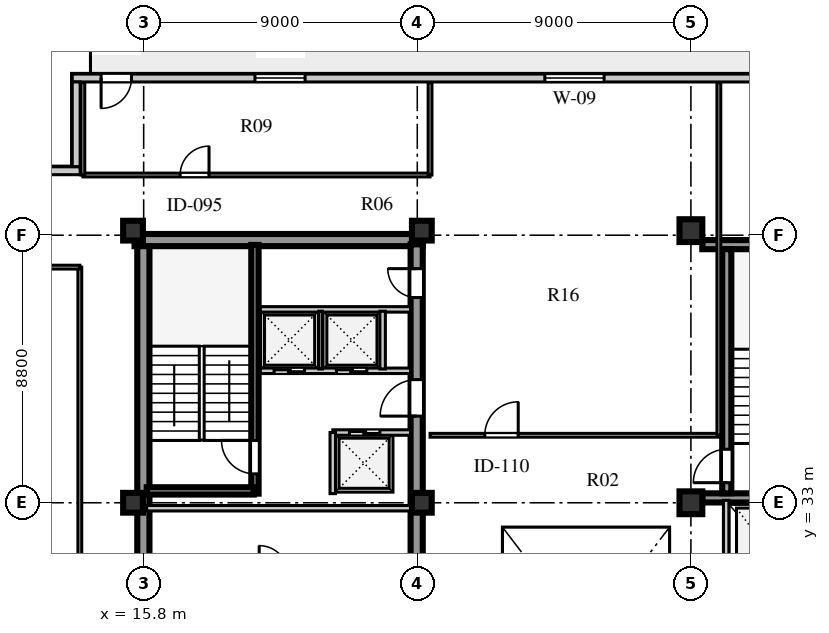
"""IFC4 building model, lengths in metres.
Left out: names, types, materials, properties, quantities, classifications, styles, units other than length and angle.
Written with IfcOpenShell. Run it as: python <this file> out.ifc"""

import sys

from ifc_helpers import new_model, si_unit, direction, frame, frame_2d, origin, origin_2d, place, context, subcontext, project, spatial, rectangle, extrude, element, fill, save


model = new_model("IFC4")
c1 = context("Model", 3, precision=1e-05, world=origin(), true_north=direction((0.0, 1.0)))
c2 = subcontext(c1, "Body", "Model", "MODEL_VIEW")
j1 = project(units=[si_unit("LENGTHUNIT", "METRE"), si_unit("PLANEANGLEUNIT", "RADIAN")], contexts=[c1])
p1 = place(None, origin())
s1 = spatial("IfcSite", under=j1, at=p1, CompositionType="ELEMENT")
p2 = place(p1, origin())
s2 = spatial("IfcBuilding", under=s1, at=p2, CompositionType="ELEMENT")
p3 = place(p2, frame((0.0, 0.0, 280.4)))
s3 = spatial("IfcBuildingStorey", under=s2, at=p3, CompositionType="ELEMENT", Elevation=280.4)
p4 = place(p3, frame((15.5, 41.64, 0.0), z_axis=(0.0, 0.0, 1.0), x_axis=(1.0, 0.0, 0.0)))
e1 = element("IfcWall", 1, at=p4, inside=s3, PredefinedType="SHEAR", context=c2, shape_type="SweptSolid", body=[
    extrude(rectangle(XDim=9.48, YDim=0.4, at=frame_2d((4.74, 0.0))), origin(), (0.0, 0.0, 1.0), 3.66),
])
p5 = place(p3, frame((15.79, 15.81, 0.0), z_axis=(0.0, 0.0, 1.0), x_axis=(0.0, 1.0, 0.0)))
e2 = element("IfcWall", 2, at=p5, inside=s3, PredefinedType="SHEAR", context=c2, shape_type="SweptSolid", body=[
    extrude(rectangle(XDim=25.63, YDim=0.4, at=frame_2d((12.815, 0.0))), origin(), (0.0, 0.0, 1.0), 3.66),
])
p6 = place(p3, frame((24.78, 15.74, 0.0), z_axis=(0.0, 0.0, 1.0), x_axis=(0.0, 1.0, 0.0)))
e3 = element("IfcWall", 3, at=p6, inside=s3, PredefinedType="SHEAR", context=c2, shape_type="SweptSolid", body=[
    extrude(rectangle(XDim=25.76, YDim=0.4, at=frame_2d((12.88, 0.0))), origin(), (0.0, 0.0, 1.0), 3.66),
])
p7 = place(p6, frame((1.61, 0.0, 0.0)))
e4 = element("IfcOpeningElement", 4, at=p7, cuts=e3, PredefinedType="OPENING", context=c2, shape_type="SweptSolid", body=[
    extrude(rectangle(XDim=1.2, YDim=2.1, at=frame_2d((0.6, 1.05))), frame((0.0, 0.21, 0.0), z_axis=(0.0, -1.0, 0.0), x_axis=(1.0, 0.0, 0.0)), (0.0, 0.0, 1.0), 0.42),
])
p8 = place(p6, frame((6.78, 0.0, 0.0)))
e5 = element("IfcOpeningElement", 5, at=p8, cuts=e3, PredefinedType="OPENING", context=c2, shape_type="SweptSolid", body=[
    extrude(rectangle(XDim=0.85, YDim=2.06, at=frame_2d((0.425, 1.03))), frame((0.0, 0.21, 0.0), z_axis=(0.0, -1.0, 0.0), x_axis=(1.0, 0.0, 0.0)), (0.0, 0.0, 1.0), 0.42),
])
p9 = place(p6, frame((12.11, 0.0, 0.0)))
e6 = element("IfcOpeningElement", 6, at=p9, cuts=e3, PredefinedType="OPENING", context=c2, shape_type="SweptSolid", body=[
    extrude(rectangle(XDim=1.5, YDim=2.12, at=frame_2d((0.75, 1.06))), frame((0.0, 0.21, 0.0), z_axis=(0.0, -1.0, 0.0), x_axis=(1.0, 0.0, 0.0)), (0.0, 0.0, 1.0), 0.42),
])
p10 = place(p6, frame((20.11, 0.0, 0.0)))
e7 = element("IfcOpeningElement", 7, at=p10, cuts=e3, PredefinedType="OPENING", context=c2, shape_type="SweptSolid", body=[
    extrude(rectangle(XDim=1.2, YDim=2.12, at=frame_2d((0.6, 1.06))), frame((0.0, 0.21, 0.0), z_axis=(0.0, -1.0, 0.0), x_axis=(1.0, 0.0, 0.0)), (0.0, 0.0, 1.0), 0.42),
])
p11 = place(p6, frame((24.01, 0.0, 0.0)))
e8 = element("IfcOpeningElement", 8, at=p11, cuts=e3, PredefinedType="OPENING", context=c2, shape_type="SweptSolid", body=[
    extrude(rectangle(XDim=0.95, YDim=2.1, at=frame_2d((0.475, 1.05))), frame((0.0, 0.21, 0.0), z_axis=(0.0, -1.0, 0.0), x_axis=(1.0, 0.0, 0.0)), (0.0, 0.0, 1.0), 0.42),
])
for number, where, z_axis, x_axis in (
    (9, (34.175, 33.16, 0.0), (0.0, 0.0, 1.0), (1.0, 0.0, 0.0)),
    (10, (34.175, 41.49, 0.0), (0.0, 0.0, 1.0), (1.0, 0.0, 0.0)),
):
    element("IfcWall", number, at=place(p3, frame(where, z_axis=z_axis, x_axis=x_axis)), inside=s3, PredefinedType="SHEAR", context=c2, shape_type="SweptSolid", body=[
        extrude(rectangle(XDim=4.695, YDim=0.3, at=frame_2d((2.348, 0.0))), origin(), (0.0, 0.0, 1.0), 3.66),
    ])
p12 = place(p3, frame((34.98, 33.31, 0.0), z_axis=(0.0, 0.0, 1.0), x_axis=(0.0, 1.0, 0.0)))
e11 = element("IfcWall", 11, at=p12, inside=s3, PredefinedType="SHEAR", context=c2, shape_type="SweptSolid", body=[
    extrude(rectangle(XDim=8.03, YDim=0.3, at=frame_2d((4.015, 0.0))), origin(), (0.0, 0.0, 1.0), 3.66),
])
p13 = place(p12, frame((0.35, 0.0, 0.0)))
e12 = element("IfcOpeningElement", 12, at=p13, cuts=e11, PredefinedType="OPENING", context=c2, shape_type="SweptSolid", body=[
    extrude(rectangle(XDim=1.1, YDim=2.1, at=frame_2d((0.55, 1.05))), frame((0.0, 0.16, 0.0), z_axis=(0.0, -1.0, 0.0), x_axis=(1.0, 0.0, 0.0)), (0.0, 0.0, 1.0), 0.32),
])
for number, where, z_axis, x_axis in (
    (13, (15.45, 33.0, 0.0), (0.0, 0.0, 1.0), (1.0, 0.0, 0.0)),
    (14, (15.45, 41.95, 0.0), (0.0, 0.0, 1.0), (1.0, 0.0, 0.0)),
    (15, (24.95, 33.0, 0.0), (0.0, 0.0, 1.0), (1.0, 0.0, 0.0)),
    (16, (24.95, 41.95, 0.0), (0.0, 0.0, 1.0), (1.0, 0.0, 0.0)),
):
    element("IfcColumn", number, at=place(p3, frame(where, z_axis=z_axis, x_axis=x_axis)), inside=s3, PredefinedType="COLUMN", context=c2, shape_type="SweptSolid", body=[
        extrude(rectangle(XDim=0.65, YDim=0.65, at=origin_2d()), origin(), (0.0, 0.0, 1.0), 3.66),
    ])
for number, where, z_axis, x_axis in (
    (17, (33.8, 33.0, 0.0), (0.0, 0.0, 1.0), (1.0, 0.0, 0.0)),
    (18, (33.8, 41.95, 0.0), (0.0, 0.0, 1.0), (1.0, 0.0, 0.0)),
):
    element("IfcColumn", number, at=place(p3, frame(where, z_axis=z_axis, x_axis=x_axis)), inside=s3, PredefinedType="COLUMN", context=c2, shape_type="SweptSolid", body=[
        extrude(rectangle(XDim=0.75, YDim=0.75, at=origin_2d()), origin(), (0.0, 0.0, 1.0), 3.66),
    ])
p14 = place(p3, frame((45.15, 46.97, 0.0), z_axis=(0.0, 0.0, 1.0), x_axis=(-1.0, 0.0, 0.0)))
e19 = element("IfcWall", 19, at=p14, inside=s3, PredefinedType="SOLIDWALL", context=c2, shape_type="SweptSolid", body=[
    extrude(rectangle(XDim=31.7, YDim=0.26, at=frame_2d((15.85, 0.0))), origin(), (0.0, 0.0, 1.0), 3.66),
])
p15 = place(p14, frame((29.75, 0.0, 0.0)))
e20 = element("IfcOpeningElement", 20, at=p15, cuts=e19, PredefinedType="OPENING", context=c2, shape_type="SweptSolid", body=[
    extrude(rectangle(XDim=1.0, YDim=2.05, at=frame_2d((0.5, 1.025))), frame((0.0, 0.14, 0.0), z_axis=(0.0, -1.0, 0.0), x_axis=(1.0, 0.0, 0.0)), (0.0, 0.0, 1.0), 0.28),
])
p16 = place(p14, frame((24.04, 0.0, 0.8)))
e21 = element("IfcOpeningElement", 21, at=p16, cuts=e19, PredefinedType="OPENING", context=c2, shape_type="SweptSolid", body=[
    extrude(rectangle(XDim=1.65, YDim=1.95, at=frame_2d((0.825, 0.975))), frame((0.0, 0.14, 0.0), z_axis=(0.0, -1.0, 0.0), x_axis=(1.0, 0.0, 0.0)), (0.0, 0.0, 1.0), 0.28),
])
p17 = place(p14, frame((14.205, 0.0, 0.8)))
e22 = element("IfcOpeningElement", 22, at=p17, cuts=e19, PredefinedType="OPENING", context=c2, shape_type="SweptSolid", body=[
    extrude(rectangle(XDim=1.95, YDim=2.0, at=frame_2d((0.975, 1.0))), frame((0.0, 0.14, 0.0), z_axis=(0.0, -1.0, 0.0), x_axis=(1.0, 0.0, 0.0)), (0.0, 0.0, 1.0), 0.28),
])
p18 = place(p14, frame((4.145, 0.0, 0.8)))
e23 = element("IfcOpeningElement", 23, at=p18, cuts=e19, PredefinedType="OPENING", context=c2, shape_type="SweptSolid", body=[
    extrude(rectangle(XDim=2.25, YDim=2.0, at=frame_2d((1.125, 1.0))), frame((0.0, 0.14, 0.0), z_axis=(0.0, -1.0, 0.0), x_axis=(1.0, 0.0, 0.0)), (0.0, 0.0, 1.0), 0.28),
])
p19 = place(p3, frame((13.58, 46.84, 0.0), z_axis=(0.0, 0.0, 1.0), x_axis=(0.0, -1.0, 0.0)))
e24 = element("IfcWall", 24, at=p19, inside=s3, PredefinedType="SOLIDWALL", context=c2, shape_type="SweptSolid", body=[
    extrude(rectangle(XDim=2.79, YDim=0.26, at=frame_2d((1.395, 0.0))), origin(), (0.0, 0.0, 1.0), 3.66),
])
p20 = place(p3, frame((13.71, 43.92, 0.0), z_axis=(0.0, 0.0, 1.0), x_axis=(-1.0, 0.0, 0.0)))
e25 = element("IfcWall", 25, at=p20, inside=s3, PredefinedType="SOLIDWALL", context=c2, shape_type="SweptSolid", body=[
    extrude(rectangle(XDim=3.31, YDim=0.26, at=frame_2d((1.655, 0.0))), origin(), (0.0, 0.0, 1.0), 3.66),
])
p21 = place(p3, frame((15.9, 32.82, 0.0), z_axis=(0.0, 0.0, 1.0), x_axis=(1.0, 0.0, 0.0)))
e26 = element("IfcWall", 26, at=p21, inside=s3, PredefinedType="SOLIDWALL", context=c2, shape_type="SweptSolid", body=[
    extrude(rectangle(XDim=8.68, YDim=0.18, at=frame_2d((4.34, 0.0))), origin(), (0.0, 0.0, 1.0), 3.06),
])
p22 = place(p3, frame((19.46, 33.3, 0.0), z_axis=(0.0, 0.0, 1.0), x_axis=(0.0, 1.0, 0.0)))
e27 = element("IfcWall", 27, at=p22, inside=s3, PredefinedType="SHEAR", context=c2, shape_type="SweptSolid", body=[
    extrude(rectangle(XDim=8.18, YDim=0.24, at=frame_2d((4.09, 0.0))), origin(), (0.0, 0.0, 1.0), 3.9),
])
p23 = place(p22, frame((0.65, 0.0, 0.0)))
e28 = element("IfcOpeningElement", 28, at=p23, cuts=e27, PredefinedType="OPENING", context=c2, shape_type="SweptSolid", body=[
    extrude(rectangle(XDim=1.1, YDim=2.1, at=frame_2d((0.55, 1.05))), frame((0.0, 0.13, 0.0), z_axis=(0.0, -1.0, 0.0), x_axis=(1.0, 0.0, 0.0)), (0.0, 0.0, 1.0), 0.26),
])
p24 = place(p3, frame((15.9, 33.39, 0.0), z_axis=(0.0, 0.0, 1.0), x_axis=(1.0, 0.0, 0.0)))
e29 = element("IfcWall", 29, at=p24, inside=s3, PredefinedType="SHEAR", context=c2, shape_type="SweptSolid", body=[
    extrude(rectangle(XDim=3.52, YDim=0.24, at=frame_2d((1.76, 0.0))), origin(), (0.0, 0.0, 1.0), 3.9),
])
p25 = place(p3, frame((22.02, 35.31, 0.0), z_axis=(0.0, 0.0, 1.0), x_axis=(1.0, 0.0, 0.0)))
e30 = element("IfcWall", 30, at=p25, inside=s3, PredefinedType="SOLIDWALL", context=c2, shape_type="SweptSolid", body=[
    extrude(rectangle(XDim=2.56, YDim=0.18, at=frame_2d((1.28, 0.0))), origin(), (0.0, 0.0, 1.0), 3.66),
])
p26 = place(p25, frame((0.55, 0.0, 0.0)))
e31 = element("IfcOpeningElement", 31, at=p26, cuts=e30, PredefinedType="OPENING", context=c2, shape_type="SweptSolid", body=[
    extrude(rectangle(XDim=1.0, YDim=2.1, at=frame_2d((0.5, 1.05))), frame((0.0, 0.1, 0.0), z_axis=(0.0, -1.0, 0.0), x_axis=(1.0, 0.0, 0.0)), (0.0, 0.0, 1.0), 0.2),
])
p27 = place(p3, frame((22.02, 33.3, 0.0), z_axis=(0.0, 0.0, 1.0), x_axis=(0.0, 1.0, 0.0)))
e32 = element("IfcWall", 32, at=p27, inside=s3, PredefinedType="SOLIDWALL", context=c2, shape_type="SweptSolid", body=[
    extrude(rectangle(XDim=2.01, YDim=0.18, at=frame_2d((1.005, 0.0))), origin(), (0.0, 0.0, 1.0), 3.66),
])
p28 = place(p3, frame((19.64, 37.34, 0.0), z_axis=(0.0, 0.0, 1.0), x_axis=(1.0, 0.0, 0.0)))
e33 = element("IfcWall", 33, at=p28, inside=s3, PredefinedType="SOLIDWALL", context=c2, shape_type="SweptSolid", body=[
    extrude(rectangle(XDim=4.94, YDim=0.18, at=frame_2d((2.47, 0.0))), origin(), (0.0, 0.0, 1.0), 3.66),
])
p29 = place(p28, frame((0.45, 0.0, 0.0)))
e34 = element("IfcOpeningElement", 34, at=p29, cuts=e33, PredefinedType="OPENING", context=c2, shape_type="SweptSolid", body=[
    extrude(rectangle(XDim=1.0, YDim=2.1, at=frame_2d((0.5, 1.05))), frame((0.0, 0.1, 0.0), z_axis=(0.0, -1.0, 0.0), x_axis=(1.0, 0.0, 0.0)), (0.0, 0.0, 1.0), 0.2),
])
p30 = place(p28, frame((2.5, 0.0, 0.0)))
e35 = element("IfcOpeningElement", 35, at=p30, cuts=e33, PredefinedType="OPENING", context=c2, shape_type="SweptSolid", body=[
    extrude(rectangle(XDim=1.0, YDim=2.1, at=frame_2d((0.5, 1.05))), frame((0.0, 0.1, 0.0), z_axis=(0.0, -1.0, 0.0), x_axis=(1.0, 0.0, 0.0)), (0.0, 0.0, 1.0), 0.2),
])
p31 = place(p3, frame((19.64, 39.36, 0.0), z_axis=(0.0, 0.0, 1.0), x_axis=(1.0, 0.0, 0.0)))
e36 = element("IfcWall", 36, at=p31, inside=s3, PredefinedType="SOLIDWALL", context=c2, shape_type="SweptSolid", body=[
    extrude(rectangle(XDim=4.94, YDim=0.18, at=frame_2d((2.47, 0.0))), origin(), (0.0, 0.0, 1.0), 3.66),
])
p32 = place(p3, frame((21.62, 37.4, 0.0), z_axis=(0.0, 0.0, 1.0), x_axis=(0.0, 1.0, 0.0)))
e37 = element("IfcWall", 37, at=p32, inside=s3, PredefinedType="PARTITIONING", context=c2, shape_type="SweptSolid", body=[
    extrude(rectangle(XDim=1.9, YDim=0.12, at=frame_2d((0.95, 0.0))), origin(), (0.0, 0.0, 1.0), 3.66),
])
p33 = place(p3, frame((23.66, 37.4, 0.0), z_axis=(0.0, 0.0, 1.0), x_axis=(0.0, 1.0, 0.0)))
e38 = element("IfcWall", 38, at=p33, inside=s3, PredefinedType="SOLIDWALL", context=c2, shape_type="SweptSolid", body=[
    extrude(rectangle(XDim=1.9, YDim=0.18, at=frame_2d((0.95, 0.0))), origin(), (0.0, 0.0, 1.0), 3.66),
])
p34 = place(p3, frame((34.96, 28.86, 0.0), z_axis=(0.0, 0.0, 1.0), x_axis=(0.0, 1.0, 0.0)))
e39 = element("IfcWall", 39, at=p34, inside=s3, PredefinedType="SOLIDWALL", context=c2, shape_type="SweptSolid", body=[
    extrude(rectangle(XDim=4.22, YDim=0.18, at=frame_2d((2.11, 0.0))), origin(), (0.0, 0.0, 1.0), 3.66),
])
p35 = place(p3, frame((25.22, 35.22, 0.0), z_axis=(0.0, 0.0, 1.0), x_axis=(1.0, 0.0, 0.0)))
e40 = element("IfcWall", 40, at=p35, inside=s3, PredefinedType="PLUMBINGWALL", context=c2, shape_type="SweptSolid", body=[
    extrude(rectangle(XDim=9.5, YDim=0.125, at=frame_2d((4.75, 0.0))), origin(), (0.0, 0.0, 1.0), 3.66),
])
p36 = place(p35, frame((1.8, 0.0, 0.0)))
e41 = element("IfcOpeningElement", 41, at=p36, cuts=e40, PredefinedType="OPENING", context=c2, shape_type="SweptSolid", body=[
    extrude(rectangle(XDim=1.1, YDim=2.08, at=frame_2d((0.55, 1.04))), frame((0.0, 0.073, 0.0), z_axis=(0.0, -1.0, 0.0), x_axis=(1.0, 0.0, 0.0)), (0.0, 0.0, 1.0), 0.145),
])
p37 = place(p3, frame((13.8, 43.78, 0.0), z_axis=(0.0, 0.0, 1.0), x_axis=(1.0, 0.0, 0.0)))
e42 = element("IfcWall", 42, at=p37, inside=s3, PredefinedType="PLUMBINGWALL", context=c2, shape_type="SweptSolid", body=[
    extrude(rectangle(XDim=11.42, YDim=0.125, at=frame_2d((5.71, 0.0))), origin(), (0.0, 0.0, 1.0), 3.66),
])
p38 = place(p37, frame((3.2, 0.0, 0.0)))
e43 = element("IfcOpeningElement", 43, at=p38, cuts=e42, PredefinedType="OPENING", context=c2, shape_type="SweptSolid", body=[
    extrude(rectangle(XDim=0.95, YDim=2.08, at=frame_2d((0.475, 1.04))), frame((0.0, 0.073, 0.0), z_axis=(0.0, -1.0, 0.0), x_axis=(1.0, 0.0, 0.0)), (0.0, 0.0, 1.0), 0.145),
])
p39 = place(p3, frame((13.8, 43.78, 0.0), z_axis=(0.0, 0.0, 1.0), x_axis=(0.0, 1.0, 0.0)))
e44 = element("IfcWall", 44, at=p39, inside=s3, PredefinedType="PLUMBINGWALL", context=c2, shape_type="SweptSolid", body=[
    extrude(rectangle(XDim=3.04, YDim=0.125, at=frame_2d((1.52, 0.0))), origin(), (0.0, 0.0, 1.0), 3.66),
])
p40 = place(p3, frame((25.22, 43.78, 0.0), z_axis=(0.0, 0.0, 1.0), x_axis=(0.0, 1.0, 0.0)))
e45 = element("IfcWall", 45, at=p40, inside=s3, PredefinedType="PLUMBINGWALL", context=c2, shape_type="SweptSolid", body=[
    extrude(rectangle(XDim=3.04, YDim=0.125, at=frame_2d((1.52, 0.0))), origin(), (0.0, 0.0, 1.0), 3.21),
])
p41 = place(p3, frame((13.7, 16.45, 0.0), z_axis=(0.0, 0.0, 1.0), x_axis=(0.0, 1.0, 0.0)))
e46 = element("IfcWall", 46, at=p41, inside=s3, PredefinedType="PLUMBINGWALL", context=c2, shape_type="SweptSolid", body=[
    extrude(rectangle(XDim=24.3, YDim=0.125, at=frame_2d((12.15, 0.0))), origin(), (0.0, 0.0, 1.0), 3.66),
])
p42 = place(p41, frame((5.1, 0.0, 0.0)))
e47 = element("IfcOpeningElement", 47, at=p42, cuts=e46, PredefinedType="OPENING", context=c2, shape_type="SweptSolid", body=[
    extrude(rectangle(XDim=0.95, YDim=2.08, at=frame_2d((0.475, 1.04))), frame((0.0, 0.073, 0.0), z_axis=(0.0, -1.0, 0.0), x_axis=(1.0, 0.0, 0.0)), (0.0, 0.0, 1.0), 0.145),
])
p43 = place(p3, frame((10.68, 40.75, 0.0), z_axis=(0.0, 0.0, 1.0), x_axis=(1.0, 0.0, 0.0)))
e48 = element("IfcWall", 48, at=p43, inside=s3, PredefinedType="PLUMBINGWALL", context=c2, shape_type="SweptSolid", body=[
    extrude(rectangle(XDim=3.02, YDim=0.125, at=frame_2d((1.51, 0.0))), origin(), (0.0, 0.0, 1.0), 3.66),
])
p44 = place(p3, frame((34.72, 35.22, 0.0), z_axis=(0.0, 0.0, 1.0), x_axis=(0.0, 1.0, 0.0)))
e49 = element("IfcWall", 49, at=p44, inside=s3, PredefinedType="PLUMBINGWALL", context=c2, shape_type="SweptSolid", body=[
    extrude(rectangle(XDim=11.6, YDim=0.125, at=frame_2d((5.8, 0.0))), origin(), (0.0, 0.0, 1.0), 3.66),
])
p45 = place(p15, frame((1.0, 0.0, 0.0), z_axis=(0.0, 0.0, 1.0), x_axis=(-1.0, 0.0, 0.0)))
e50 = element("IfcDoor", 50, at=p45, inside=s3, OperationType="SINGLE_SWING_LEFT", PredefinedType="DOOR", context=c2, shape_type="SweptSolid", body=[
    extrude(rectangle(XDim=1.0, YDim=2.05, at=frame_2d((0.5, 1.025))), frame((0.0, 0.025, 0.0), z_axis=(0.0, -1.0, 0.0), x_axis=(1.0, 0.0, 0.0)), (0.0, 0.0, 1.0), 0.05),
])
fill(e20, e50)
p46 = place(p16, origin())
e51 = element("IfcWindow", 51, at=p46, inside=s3, PartitioningType="SINGLE_PANEL", PredefinedType="WINDOW", context=c2, shape_type="SweptSolid", body=[
    extrude(rectangle(XDim=1.65, YDim=1.95, at=frame_2d((0.825, 0.975))), frame((0.0, 0.03, 0.0), z_axis=(0.0, -1.0, 0.0), x_axis=(1.0, 0.0, 0.0)), (0.0, 0.0, 1.0), 0.06),
])
fill(e21, e51)
p47 = place(p17, origin())
e52 = element("IfcWindow", 52, at=p47, inside=s3, PartitioningType="SINGLE_PANEL", PredefinedType="WINDOW", context=c2, shape_type="SweptSolid", body=[
    extrude(rectangle(XDim=1.95, YDim=2.0, at=frame_2d((0.975, 1.0))), frame((0.0, 0.03, 0.0), z_axis=(0.0, -1.0, 0.0), x_axis=(1.0, 0.0, 0.0)), (0.0, 0.0, 1.0), 0.06),
])
fill(e22, e52)
p48 = place(p23, origin())
e53 = element("IfcDoor", 53, at=p48, inside=s3, OperationType="SINGLE_SWING_RIGHT", PredefinedType="DOOR", context=c2, shape_type="SweptSolid", body=[
    extrude(rectangle(XDim=1.1, YDim=2.1, at=frame_2d((0.55, 1.05))), frame((0.0, 0.025, 0.0), z_axis=(0.0, -1.0, 0.0), x_axis=(1.0, 0.0, 0.0)), (0.0, 0.0, 1.0), 0.05),
])
fill(e28, e53)
p49 = place(p10, frame((1.2, 0.0, 0.0), z_axis=(0.0, 0.0, 1.0), x_axis=(-1.0, 0.0, 0.0)))
e54 = element("IfcDoor", 54, at=p49, inside=s3, OperationType="SINGLE_SWING_RIGHT", PredefinedType="DOOR", context=c2, shape_type="SweptSolid", body=[
    extrude(rectangle(XDim=1.2, YDim=2.12, at=frame_2d((0.6, 1.06))), frame((0.0, 0.025, 0.0), z_axis=(0.0, -1.0, 0.0), x_axis=(1.0, 0.0, 0.0)), (0.0, 0.0, 1.0), 0.05),
])
fill(e7, e54)
p50 = place(p29, frame((1.0, 0.0, 0.0), z_axis=(0.0, 0.0, 1.0), x_axis=(-1.0, 0.0, 0.0)))
e55 = element("IfcDoor", 55, at=p50, inside=s3, OperationType="DOUBLE_DOOR_SLIDING", PredefinedType="DOOR", context=c2, shape_type="SweptSolid", body=[
    extrude(rectangle(XDim=1.0, YDim=2.1, at=frame_2d((0.5, 1.05))), frame((0.0, 0.025, 0.0), z_axis=(0.0, -1.0, 0.0), x_axis=(1.0, 0.0, 0.0)), (0.0, 0.0, 1.0), 0.05),
])
fill(e34, e55)
p51 = place(p30, frame((1.0, 0.0, 0.0), z_axis=(0.0, 0.0, 1.0), x_axis=(-1.0, 0.0, 0.0)))
e56 = element("IfcDoor", 56, at=p51, inside=s3, OperationType="DOUBLE_DOOR_SLIDING", PredefinedType="DOOR", context=c2, shape_type="SweptSolid", body=[
    extrude(rectangle(XDim=1.0, YDim=2.1, at=frame_2d((0.5, 1.05))), frame((0.0, 0.025, 0.0), z_axis=(0.0, -1.0, 0.0), x_axis=(1.0, 0.0, 0.0)), (0.0, 0.0, 1.0), 0.05),
])
fill(e35, e56)
p52 = place(p26, origin())
e57 = element("IfcDoor", 57, at=p52, inside=s3, OperationType="DOUBLE_DOOR_SLIDING", PredefinedType="DOOR", context=c2, shape_type="SweptSolid", body=[
    extrude(rectangle(XDim=1.0, YDim=2.1, at=frame_2d((0.5, 1.05))), frame((0.0, 0.025, 0.0), z_axis=(0.0, -1.0, 0.0), x_axis=(1.0, 0.0, 0.0)), (0.0, 0.0, 1.0), 0.05),
])
fill(e31, e57)
p53 = place(p11, frame((0.95, 0.0, 0.0), z_axis=(0.0, 0.0, 1.0), x_axis=(-1.0, 0.0, 0.0)))
e58 = element("IfcDoor", 58, at=p53, inside=s3, OperationType="SINGLE_SWING_LEFT", PredefinedType="DOOR", context=c2, shape_type="SweptSolid", body=[
    extrude(rectangle(XDim=0.95, YDim=2.1, at=frame_2d((0.475, 1.05))), frame((0.0, 0.025, 0.0), z_axis=(0.0, -1.0, 0.0), x_axis=(1.0, 0.0, 0.0)), (0.0, 0.0, 1.0), 0.05),
])
fill(e8, e58)
p54 = place(p13, origin())
e59 = element("IfcDoor", 59, at=p54, inside=s3, OperationType="SINGLE_SWING_LEFT", PredefinedType="DOOR", context=c2, shape_type="SweptSolid", body=[
    extrude(rectangle(XDim=1.1, YDim=2.1, at=frame_2d((0.55, 1.05))), frame((0.0, 0.025, 0.0), z_axis=(0.0, -1.0, 0.0), x_axis=(1.0, 0.0, 0.0)), (0.0, 0.0, 1.0), 0.05),
])
fill(e12, e59)
p55 = place(p38, origin())
e60 = element("IfcDoor", 60, at=p55, inside=s3, OperationType="SINGLE_SWING_RIGHT", PredefinedType="DOOR", context=c2, shape_type="SweptSolid", body=[
    extrude(rectangle(XDim=0.95, YDim=2.08, at=frame_2d((0.475, 1.04))), frame((0.0, 0.025, 0.0), z_axis=(0.0, -1.0, 0.0), x_axis=(1.0, 0.0, 0.0)), (0.0, 0.0, 1.0), 0.05),
])
fill(e43, e60)
p56 = place(p36, origin())
e61 = element("IfcDoor", 61, at=p56, inside=s3, OperationType="SINGLE_SWING_RIGHT", PredefinedType="DOOR", context=c2, shape_type="SweptSolid", body=[
    extrude(rectangle(XDim=1.1, YDim=2.08, at=frame_2d((0.55, 1.04))), frame((0.0, 0.025, 0.0), z_axis=(0.0, -1.0, 0.0), x_axis=(1.0, 0.0, 0.0)), (0.0, 0.0, 1.0), 0.05),
])
fill(e41, e61)
save(model, sys.argv[1])
